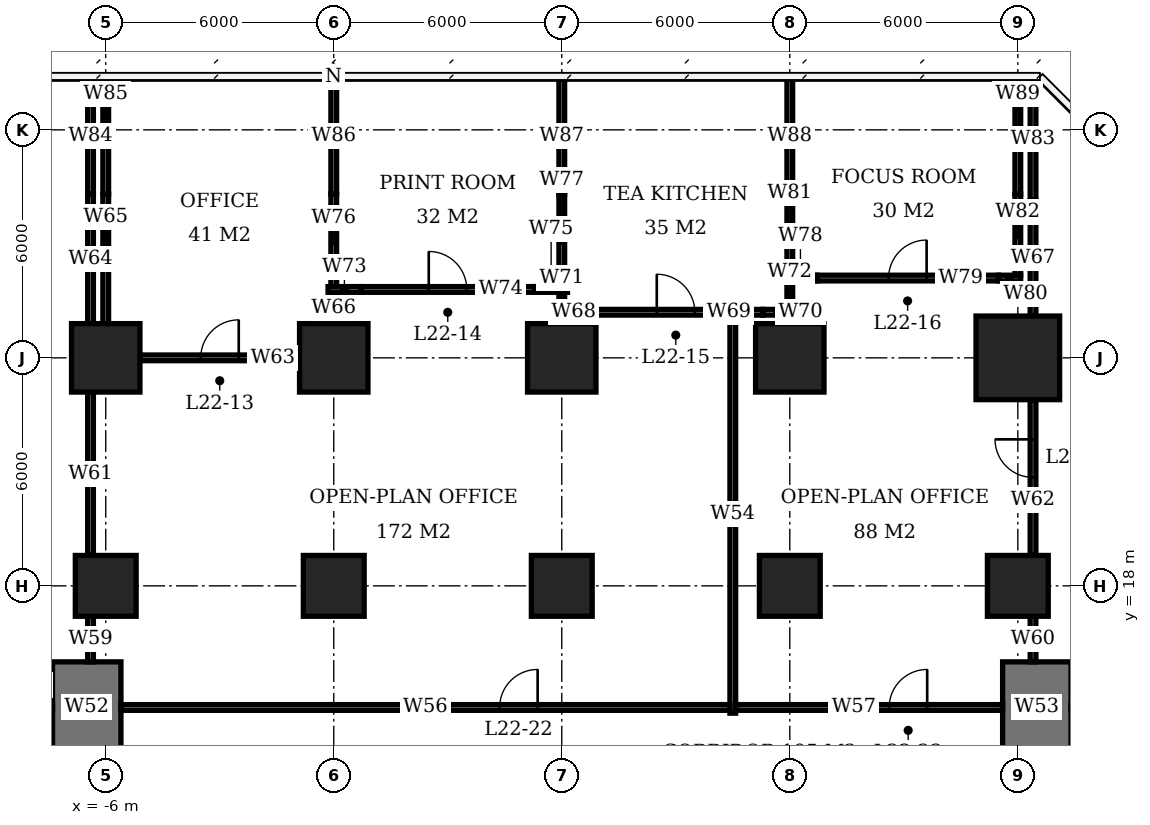
"""IFC4 building model, lengths in metres.
Left out: names, types, materials, properties, quantities, classifications, styles, units other than length and angle.
Written with IfcOpenShell. Run it as: python <this file> out.ifc"""

import sys

from ifc_helpers import new_model, si_unit, direction, frame, frame_2d, origin, origin_2d, place, context, subcontext, project, spatial, rectangle, extrude, element, fill, save


model = new_model("IFC4")
c1 = context("Model", 3, precision=1e-05, world=origin(), true_north=direction((0.0, 1.0)))
c2 = subcontext(c1, "Body", "Model", "MODEL_VIEW")
j1 = project(units=[si_unit("LENGTHUNIT", "METRE"), si_unit("PLANEANGLEUNIT", "RADIAN")], contexts=[c1])
p1 = place(None, origin())
s1 = spatial("IfcSite", under=j1, at=p1, CompositionType="ELEMENT")
p2 = place(p1, origin())
s2 = spatial("IfcBuilding", under=s1, at=p2, CompositionType="ELEMENT")
p3 = place(p2, frame((0.0, 0.0, 93.8)))
s3 = spatial("IfcBuildingStorey", under=s2, at=p3, CompositionType="ELEMENT", Elevation=93.8)
p4 = place(p3, frame((-6.0, 18.0, 0.0), z_axis=(0.0, 0.0, 1.0), x_axis=(1.0, 0.0, 0.0)))
e1 = element("IfcColumn", 1, at=p4, inside=s3, PredefinedType="COLUMN", context=c2, shape_type="SweptSolid", body=[
    extrude(rectangle(XDim=1.6, YDim=1.6, at=origin_2d()), origin(), (0.0, 0.0, 1.0), 3.9),
])
p5 = place(p3, frame((-6.0, 24.0, 0.0), z_axis=(0.0, 0.0, 1.0), x_axis=(1.0, 0.0, 0.0)))
e2 = element("IfcColumn", 2, at=p5, inside=s3, PredefinedType="COLUMN", context=c2, shape_type="SweptSolid", body=[
    extrude(rectangle(XDim=1.8, YDim=1.8, at=origin_2d()), origin(), (0.0, 0.0, 1.0), 3.9),
])
p6 = place(p3, frame((0.0, 18.0, 0.0), z_axis=(0.0, 0.0, 1.0), x_axis=(1.0, 0.0, 0.0)))
e3 = element("IfcColumn", 3, at=p6, inside=s3, PredefinedType="COLUMN", context=c2, shape_type="SweptSolid", body=[
    extrude(rectangle(XDim=1.6, YDim=1.6, at=origin_2d()), origin(), (0.0, 0.0, 1.0), 3.9),
])
p7 = place(p3, frame((0.0, 24.0, 0.0), z_axis=(0.0, 0.0, 1.0), x_axis=(1.0, 0.0, 0.0)))
e4 = element("IfcColumn", 4, at=p7, inside=s3, PredefinedType="COLUMN", context=c2, shape_type="SweptSolid", body=[
    extrude(rectangle(XDim=1.8, YDim=1.8, at=origin_2d()), origin(), (0.0, 0.0, 1.0), 3.9),
])
p8 = place(p3, frame((6.0, 18.0, 0.0), z_axis=(0.0, 0.0, 1.0), x_axis=(1.0, 0.0, 0.0)))
e5 = element("IfcColumn", 5, at=p8, inside=s3, PredefinedType="COLUMN", context=c2, shape_type="SweptSolid", body=[
    extrude(rectangle(XDim=1.6, YDim=1.6, at=origin_2d()), origin(), (0.0, 0.0, 1.0), 3.9),
])
p9 = place(p3, frame((6.0, 24.0, 0.0), z_axis=(0.0, 0.0, 1.0), x_axis=(1.0, 0.0, 0.0)))
e6 = element("IfcColumn", 6, at=p9, inside=s3, PredefinedType="COLUMN", context=c2, shape_type="SweptSolid", body=[
    extrude(rectangle(XDim=1.8, YDim=1.8, at=origin_2d()), origin(), (0.0, 0.0, 1.0), 3.9),
])
p10 = place(p3, frame((12.0, 18.0, 0.0), z_axis=(0.0, 0.0, 1.0), x_axis=(1.0, 0.0, 0.0)))
e7 = element("IfcColumn", 7, at=p10, inside=s3, PredefinedType="COLUMN", context=c2, shape_type="SweptSolid", body=[
    extrude(rectangle(XDim=1.6, YDim=1.6, at=origin_2d()), origin(), (0.0, 0.0, 1.0), 3.9),
])
p11 = place(p3, frame((12.0, 24.0, 0.0), z_axis=(0.0, 0.0, 1.0), x_axis=(1.0, 0.0, 0.0)))
e8 = element("IfcColumn", 8, at=p11, inside=s3, PredefinedType="COLUMN", context=c2, shape_type="SweptSolid", body=[
    extrude(rectangle(XDim=1.8, YDim=1.8, at=origin_2d()), origin(), (0.0, 0.0, 1.0), 3.9),
])
p12 = place(p3, frame((18.0, 18.0, 0.0), z_axis=(0.0, 0.0, 1.0), x_axis=(1.0, 0.0, 0.0)))
e9 = element("IfcColumn", 9, at=p12, inside=s3, PredefinedType="COLUMN", context=c2, shape_type="SweptSolid", body=[
    extrude(rectangle(XDim=1.6, YDim=1.6, at=origin_2d()), origin(), (0.0, 0.0, 1.0), 3.9),
])
p13 = place(p3, frame((18.0, 24.0, 0.0), z_axis=(0.0, 0.0, 1.0), x_axis=(1.0, 0.0, 0.0)))
e10 = element("IfcColumn", 10, at=p13, inside=s3, PredefinedType="COLUMN", context=c2, shape_type="SweptSolid", body=[
    extrude(rectangle(XDim=2.2, YDim=2.2, at=origin_2d()), origin(), (0.0, 0.0, 1.0), 3.9),
])
for number, where, z_axis, x_axis in (
    (11, (-6.5, 13.6, 0.0), (0.0, 0.0, 1.0), (0.0, 1.0, 0.0)),
    (12, (18.5, 13.6, 0.0), (0.0, 0.0, 1.0), (0.0, 1.0, 0.0)),
):
    element("IfcWall", number, at=place(p3, frame(where, z_axis=z_axis, x_axis=x_axis)), inside=s3, PredefinedType="SHEAR", context=c2, shape_type="SweptSolid", body=[
        extrude(rectangle(XDim=2.4, YDim=1.8, at=frame_2d((1.2, 0.0))), origin(), (0.0, 0.0, 1.0), 3.9),
    ])
p14 = place(p3, frame((-5.1, 24.0, 0.0), z_axis=(0.0, 0.0, 1.0), x_axis=(1.0, 0.0, 0.0)))
e13 = element("IfcWall", 13, at=p14, inside=s3, PredefinedType="PARTITIONING", context=c2, shape_type="SweptSolid", body=[
    extrude(rectangle(XDim=4.2, YDim=0.15, at=frame_2d((2.1, 0.0))), origin(), (0.0, 0.0, 1.0), 3.65),
])
p15 = place(p14, frame((1.6, 0.0, 0.0)))
e14 = element("IfcOpeningElement", 14, at=p15, cuts=e13, PredefinedType="OPENING", context=c2, shape_type="SweptSolid", body=[
    extrude(rectangle(XDim=1.0, YDim=2.1, at=frame_2d((0.5, 1.05))), frame((0.0, 0.085, 0.0), z_axis=(0.0, -1.0, 0.0), x_axis=(1.0, 0.0, 0.0)), (0.0, 0.0, 1.0), 0.17),
])
p16 = place(p3, frame((5.925, 25.2, 0.0), z_axis=(0.0, 0.0, 1.0), x_axis=(1.0, 0.0, 0.0)))
e15 = element("IfcWall", 15, at=p16, inside=s3, PredefinedType="PARTITIONING", context=c2, shape_type="SweptSolid", body=[
    extrude(rectangle(XDim=0.785, YDim=0.15, at=frame_2d((0.393, 0.0))), origin(), (0.0, 0.0, 1.0), 2.65),
])
p17 = place(p3, frame((6.71, 25.2, 0.0), z_axis=(0.0, 0.0, 1.0), x_axis=(1.0, 0.0, 0.0)))
e16 = element("IfcWall", 16, at=p17, inside=s3, PredefinedType="PARTITIONING", context=c2, shape_type="SweptSolid", body=[
    extrude(rectangle(XDim=4.58, YDim=0.15, at=frame_2d((2.29, 0.0))), origin(), (0.0, 0.0, 1.0), 3.65),
])
p18 = place(p17, frame((1.79, 0.0, 0.0)))
e17 = element("IfcOpeningElement", 17, at=p18, cuts=e16, PredefinedType="OPENING", context=c2, shape_type="SweptSolid", body=[
    extrude(rectangle(XDim=1.0, YDim=2.1, at=frame_2d((0.5, 1.05))), frame((0.0, 0.085, 0.0), z_axis=(0.0, -1.0, 0.0), x_axis=(1.0, 0.0, 0.0)), (0.0, 0.0, 1.0), 0.17),
])
p19 = place(p3, frame((11.29, 25.2, 0.0), z_axis=(0.0, 0.0, 1.0), x_axis=(1.0, 0.0, 0.0)))
e18 = element("IfcWall", 18, at=p19, inside=s3, PredefinedType="PARTITIONING", context=c2, shape_type="SweptSolid", body=[
    extrude(rectangle(XDim=0.785, YDim=0.15, at=frame_2d((0.393, 0.0))), origin(), (0.0, 0.0, 1.0), 2.65),
])
p20 = place(p3, frame((-0.15, 25.8, 0.0), z_axis=(0.0, 0.0, 1.0), x_axis=(1.0, 0.0, 0.0)))
e19 = element("IfcWall", 19, at=p20, inside=s3, PredefinedType="PARTITIONING", context=c2, shape_type="SweptSolid", body=[
    extrude(rectangle(XDim=0.86, YDim=0.15, at=frame_2d((0.43, 0.0))), origin(), (0.0, 0.0, 1.0), 2.65),
])
p21 = place(p3, frame((0.71, 25.8, 0.0), z_axis=(0.0, 0.0, 1.0), x_axis=(1.0, 0.0, 0.0)))
e20 = element("IfcWall", 20, at=p21, inside=s3, PredefinedType="PARTITIONING", context=c2, shape_type="SweptSolid", body=[
    extrude(rectangle(XDim=4.58, YDim=0.15, at=frame_2d((2.29, 0.0))), origin(), (0.0, 0.0, 1.0), 3.65),
])
p22 = place(p21, frame((1.79, 0.0, 0.0)))
e21 = element("IfcOpeningElement", 21, at=p22, cuts=e20, PredefinedType="OPENING", context=c2, shape_type="SweptSolid", body=[
    extrude(rectangle(XDim=1.0, YDim=2.1, at=frame_2d((0.5, 1.05))), frame((0.0, 0.085, 0.0), z_axis=(0.0, -1.0, 0.0), x_axis=(1.0, 0.0, 0.0)), (0.0, 0.0, 1.0), 0.17),
])
for number, where, z_axis, x_axis in (
    (22, (5.29, 25.8, 0.0), (0.0, 0.0, 1.0), (1.0, 0.0, 0.0)),
    (23, (11.85, 26.1, 0.0), (0.0, 0.0, 1.0), (1.0, 0.0, 0.0)),
):
    element("IfcWall", number, at=place(p3, frame(where, z_axis=z_axis, x_axis=x_axis)), inside=s3, PredefinedType="PARTITIONING", context=c2, shape_type="SweptSolid", body=[
        extrude(rectangle(XDim=0.86, YDim=0.15, at=frame_2d((0.43, 0.0))), origin(), (0.0, 0.0, 1.0), 2.65),
    ])
p23 = place(p3, frame((12.71, 26.1, 0.0), z_axis=(0.0, 0.0, 1.0), x_axis=(1.0, 0.0, 0.0)))
e24 = element("IfcWall", 24, at=p23, inside=s3, PredefinedType="PARTITIONING", context=c2, shape_type="SweptSolid", body=[
    extrude(rectangle(XDim=4.78, YDim=0.15, at=frame_2d((2.39, 0.0))), origin(), (0.0, 0.0, 1.0), 3.65),
])
p24 = place(p23, frame((1.89, 0.0, 0.0)))
e25 = element("IfcOpeningElement", 25, at=p24, cuts=e24, PredefinedType="OPENING", context=c2, shape_type="SweptSolid", body=[
    extrude(rectangle(XDim=1.0, YDim=2.1, at=frame_2d((0.5, 1.05))), frame((0.0, 0.085, 0.0), z_axis=(0.0, -1.0, 0.0), x_axis=(1.0, 0.0, 0.0)), (0.0, 0.0, 1.0), 0.17),
])
p25 = place(p3, frame((17.49, 26.1, 0.0), z_axis=(0.0, 0.0, 1.0), x_axis=(1.0, 0.0, 0.0)))
e26 = element("IfcWall", 26, at=p25, inside=s3, PredefinedType="PARTITIONING", context=c2, shape_type="SweptSolid", body=[
    extrude(rectangle(XDim=0.585, YDim=0.15, at=frame_2d((0.292, 0.0))), origin(), (0.0, 0.0, 1.0), 2.65),
])
p26 = place(p3, frame((-6.0, 24.9, 0.0), z_axis=(0.0, 0.0, 1.0), x_axis=(0.0, 1.0, 0.0)))
e27 = element("IfcWall", 27, at=p26, inside=s3, PredefinedType="PARTITIONING", context=c2, shape_type="SweptSolid", body=[
    extrude(rectangle(XDim=3.41, YDim=0.15, at=frame_2d((1.705, 0.0))), origin(), (0.0, 0.0, 1.0), 2.65),
])
p27 = place(p3, frame((-6.0, 28.31, 0.0), z_axis=(0.0, 0.0, 1.0), x_axis=(0.0, 1.0, 0.0)))
e28 = element("IfcWall", 28, at=p27, inside=s3, PredefinedType="PARTITIONING", context=c2, shape_type="SweptSolid", body=[
    extrude(rectangle(XDim=3.065, YDim=0.15, at=frame_2d((1.532, 0.0))), origin(), (0.0, 0.0, 1.0), 3.65),
])
p28 = place(p3, frame((0.0, 24.9, 0.0), z_axis=(0.0, 0.0, 1.0), x_axis=(0.0, 1.0, 0.0)))
e29 = element("IfcWall", 29, at=p28, inside=s3, PredefinedType="PARTITIONING", context=c2, shape_type="SweptSolid", body=[
    extrude(rectangle(XDim=0.825, YDim=0.15, at=frame_2d((0.413, 0.0))), origin(), (0.0, 0.0, 1.0), 2.65),
])
p29 = place(p3, frame((0.0, 25.875, 0.0), z_axis=(0.0, 0.0, 1.0), x_axis=(0.0, 1.0, 0.0)))
e30 = element("IfcWall", 30, at=p29, inside=s3, PredefinedType="PARTITIONING", context=c2, shape_type="SweptSolid", body=[
    extrude(rectangle(XDim=2.435, YDim=0.15, at=frame_2d((1.218, 0.0))), origin(), (0.0, 0.0, 1.0), 2.65),
])
p30 = place(p3, frame((0.0, 28.31, 0.0), z_axis=(0.0, 0.0, 1.0), x_axis=(0.0, 1.0, 0.0)))
e31 = element("IfcWall", 31, at=p30, inside=s3, PredefinedType="PARTITIONING", context=c2, shape_type="SweptSolid", body=[
    extrude(rectangle(XDim=3.04, YDim=0.15, at=frame_2d((1.52, 0.0))), origin(), (0.0, 0.0, 1.0), 3.65),
])
p31 = place(p3, frame((6.0, 25.275, 0.0), z_axis=(0.0, 0.0, 1.0), x_axis=(0.0, 1.0, 0.0)))
e32 = element("IfcWall", 32, at=p31, inside=s3, PredefinedType="PARTITIONING", context=c2, shape_type="SweptSolid", body=[
    extrude(rectangle(XDim=0.45, YDim=0.15, at=frame_2d((0.225, 0.0))), origin(), (0.0, 0.0, 1.0), 2.65),
])
p32 = place(p3, frame((6.0, 25.875, 0.0), z_axis=(0.0, 0.0, 1.0), x_axis=(0.0, 1.0, 0.0)))
e33 = element("IfcWall", 33, at=p32, inside=s3, PredefinedType="PARTITIONING", context=c2, shape_type="SweptSolid", body=[
    extrude(rectangle(XDim=2.435, YDim=0.15, at=frame_2d((1.218, 0.0))), origin(), (0.0, 0.0, 1.0), 2.65),
])
p33 = place(p3, frame((6.0, 28.31, 0.0), z_axis=(0.0, 0.0, 1.0), x_axis=(0.0, 1.0, 0.0)))
e34 = element("IfcWall", 34, at=p33, inside=s3, PredefinedType="PARTITIONING", context=c2, shape_type="SweptSolid", body=[
    extrude(rectangle(XDim=3.065, YDim=0.15, at=frame_2d((1.532, 0.0))), origin(), (0.0, 0.0, 1.0), 3.65),
])
p34 = place(p3, frame((12.0, 25.275, 0.0), z_axis=(0.0, 0.0, 1.0), x_axis=(0.0, 1.0, 0.0)))
e35 = element("IfcWall", 35, at=p34, inside=s3, PredefinedType="PARTITIONING", context=c2, shape_type="SweptSolid", body=[
    extrude(rectangle(XDim=0.75, YDim=0.15, at=frame_2d((0.375, 0.0))), origin(), (0.0, 0.0, 1.0), 2.65),
])
p35 = place(p3, frame((12.0, 26.175, 0.0), z_axis=(0.0, 0.0, 1.0), x_axis=(0.0, 1.0, 0.0)))
e36 = element("IfcWall", 36, at=p35, inside=s3, PredefinedType="PARTITIONING", context=c2, shape_type="SweptSolid", body=[
    extrude(rectangle(XDim=2.135, YDim=0.15, at=frame_2d((1.067, 0.0))), origin(), (0.0, 0.0, 1.0), 2.65),
])
p36 = place(p3, frame((12.0, 28.31, 0.0), z_axis=(0.0, 0.0, 1.0), x_axis=(0.0, 1.0, 0.0)))
e37 = element("IfcWall", 37, at=p36, inside=s3, PredefinedType="PARTITIONING", context=c2, shape_type="SweptSolid", body=[
    extrude(rectangle(XDim=3.065, YDim=0.15, at=frame_2d((1.532, 0.0))), origin(), (0.0, 0.0, 1.0), 3.65),
])
p37 = place(p3, frame((18.0, 26.175, 0.0), z_axis=(0.0, 0.0, 1.0), x_axis=(0.0, 1.0, 0.0)))
e38 = element("IfcWall", 38, at=p37, inside=s3, PredefinedType="PARTITIONING", context=c2, shape_type="SweptSolid", body=[
    extrude(rectangle(XDim=2.135, YDim=0.15, at=frame_2d((1.067, 0.0))), origin(), (0.0, 0.0, 1.0), 2.65),
])
p38 = place(p3, frame((18.0, 28.31, 0.0), z_axis=(0.0, 0.0, 1.0), x_axis=(0.0, 1.0, 0.0)))
e39 = element("IfcWall", 39, at=p38, inside=s3, PredefinedType="PARTITIONING", context=c2, shape_type="SweptSolid", body=[
    extrude(rectangle(XDim=3.065, YDim=0.15, at=frame_2d((1.532, 0.0))), origin(), (0.0, 0.0, 1.0), 3.65),
])
p39 = place(p3, frame((-6.4, 16.0, 0.0), z_axis=(0.0, 0.0, 1.0), x_axis=(0.0, 1.0, 0.0)))
e40 = element("IfcWall", 40, at=p39, inside=s3, PredefinedType="PARTITIONING", context=c2, shape_type="SweptSolid", body=[
    extrude(rectangle(XDim=1.2, YDim=0.15, at=frame_2d((0.6, 0.0))), origin(), (0.0, 0.0, 1.0), 3.65),
])
p40 = place(p3, frame((-6.4, 18.8, 0.0), z_axis=(0.0, 0.0, 1.0), x_axis=(0.0, 1.0, 0.0)))
e41 = element("IfcWall", 41, at=p40, inside=s3, PredefinedType="PARTITIONING", context=c2, shape_type="SweptSolid", body=[
    extrude(rectangle(XDim=4.3, YDim=0.15, at=frame_2d((2.15, 0.0))), origin(), (0.0, 0.0, 1.0), 3.65),
])
p41 = place(p3, frame((-6.4, 24.9, 0.0), z_axis=(0.0, 0.0, 1.0), x_axis=(0.0, 1.0, 0.0)))
e42 = element("IfcWall", 42, at=p41, inside=s3, PredefinedType="PARTITIONING", context=c2, shape_type="SweptSolid", body=[
    extrude(rectangle(XDim=3.41, YDim=0.15, at=frame_2d((1.705, 0.0))), origin(), (0.0, 0.0, 1.0), 2.65),
])
p42 = place(p3, frame((-6.4, 28.31, 0.0), z_axis=(0.0, 0.0, 1.0), x_axis=(0.0, 1.0, 0.0)))
e43 = element("IfcWall", 43, at=p42, inside=s3, PredefinedType="PARTITIONING", context=c2, shape_type="SweptSolid", body=[
    extrude(rectangle(XDim=3.065, YDim=0.15, at=frame_2d((1.532, 0.0))), origin(), (0.0, 0.0, 1.0), 3.65),
])
p43 = place(p3, frame((-5.6, 14.8, 0.0), z_axis=(0.0, 0.0, 1.0), x_axis=(1.0, 0.0, 0.0)))
e44 = element("IfcWall", 44, at=p43, inside=s3, PredefinedType="PARTITIONING", context=c2, shape_type="SweptSolid", body=[
    extrude(rectangle(XDim=16.025, YDim=0.15, at=frame_2d((8.013, 0.0))), origin(), (0.0, 0.0, 1.0), 3.65),
])
p44 = place(p43, frame((9.965, 0.0, 0.0)))
e45 = element("IfcOpeningElement", 45, at=p44, cuts=e44, PredefinedType="OPENING", context=c2, shape_type="SweptSolid", body=[
    extrude(rectangle(XDim=1.0, YDim=2.1, at=frame_2d((0.5, 1.05))), frame((0.0, 0.085, 0.0), z_axis=(0.0, -1.0, 0.0), x_axis=(1.0, 0.0, 0.0)), (0.0, 0.0, 1.0), 0.17),
])
p45 = place(p3, frame((10.5, 14.65, 0.0), z_axis=(0.0, 0.0, 1.0), x_axis=(0.0, 1.0, 0.0)))
e46 = element("IfcWall", 46, at=p45, inside=s3, PredefinedType="PARTITIONING", context=c2, shape_type="SweptSolid", body=[
    extrude(rectangle(XDim=10.475, YDim=0.15, at=frame_2d((5.238, 0.0))), origin(), (0.0, 0.0, 1.0), 3.65),
])
p46 = place(p3, frame((10.575, 14.8, 0.0), z_axis=(0.0, 0.0, 1.0), x_axis=(1.0, 0.0, 0.0)))
e47 = element("IfcWall", 47, at=p46, inside=s3, PredefinedType="PARTITIONING", context=c2, shape_type="SweptSolid", body=[
    extrude(rectangle(XDim=7.025, YDim=0.15, at=frame_2d((3.513, 0.0))), origin(), (0.0, 0.0, 1.0), 3.65),
])
p47 = place(p46, frame((4.04, 0.0, 0.0)))
e48 = element("IfcOpeningElement", 48, at=p47, cuts=e47, PredefinedType="OPENING", context=c2, shape_type="SweptSolid", body=[
    extrude(rectangle(XDim=1.0, YDim=2.1, at=frame_2d((0.5, 1.05))), frame((0.0, 0.085, 0.0), z_axis=(0.0, -1.0, 0.0), x_axis=(1.0, 0.0, 0.0)), (0.0, 0.0, 1.0), 0.17),
])
p48 = place(p3, frame((18.4, 16.0, 0.0), z_axis=(0.0, 0.0, 1.0), x_axis=(0.0, 1.0, 0.0)))
e49 = element("IfcWall", 49, at=p48, inside=s3, PredefinedType="PARTITIONING", context=c2, shape_type="SweptSolid", body=[
    extrude(rectangle(XDim=1.2, YDim=0.15, at=frame_2d((0.6, 0.0))), origin(), (0.0, 0.0, 1.0), 3.65),
])
p49 = place(p3, frame((18.4, 18.8, 0.0), z_axis=(0.0, 0.0, 1.0), x_axis=(0.0, 1.0, 0.0)))
e50 = element("IfcWall", 50, at=p49, inside=s3, PredefinedType="PARTITIONING", context=c2, shape_type="SweptSolid", body=[
    extrude(rectangle(XDim=4.1, YDim=0.15, at=frame_2d((2.05, 0.0))), origin(), (0.0, 0.0, 1.0), 3.65),
])
p50 = place(p49, frame((2.055, 0.0, 0.0)))
e51 = element("IfcOpeningElement", 51, at=p50, cuts=e50, PredefinedType="OPENING", context=c2, shape_type="SweptSolid", body=[
    extrude(rectangle(XDim=1.0, YDim=2.1, at=frame_2d((0.5, 1.05))), frame((0.0, 0.085, 0.0), z_axis=(0.0, -1.0, 0.0), x_axis=(1.0, 0.0, 0.0)), (0.0, 0.0, 1.0), 0.17),
])
p51 = place(p3, frame((18.4, 25.1, 0.0), z_axis=(0.0, 0.0, 1.0), x_axis=(0.0, 1.0, 0.0)))
e52 = element("IfcWall", 52, at=p51, inside=s3, PredefinedType="PARTITIONING", context=c2, shape_type="SweptSolid", body=[
    extrude(rectangle(XDim=3.04, YDim=0.15, at=frame_2d((1.52, 0.0))), origin(), (0.0, 0.0, 1.0), 2.65),
])
p52 = place(p3, frame((18.4, 28.14, 0.0), z_axis=(0.0, 0.0, 1.0), x_axis=(0.0, 1.0, 0.0)))
e53 = element("IfcWall", 53, at=p52, inside=s3, PredefinedType="PARTITIONING", context=c2, shape_type="SweptSolid", body=[
    extrude(rectangle(XDim=3.235, YDim=0.15, at=frame_2d((1.618, 0.0))), origin(), (0.0, 0.0, 1.0), 3.65),
])
p53 = place(p15, origin())
e54 = element("IfcDoor", 54, at=p53, inside=s3, OperationType="SINGLE_SWING_RIGHT", PredefinedType="DOOR", context=c2, shape_type="SweptSolid", body=[
    extrude(rectangle(XDim=1.0, YDim=2.1, at=frame_2d((0.5, 1.05))), frame((0.0, 0.025, 0.0), z_axis=(0.0, -1.0, 0.0), x_axis=(1.0, 0.0, 0.0)), (0.0, 0.0, 1.0), 0.05),
])
fill(e14, e54)
p54 = place(p22, origin())
e55 = element("IfcDoor", 55, at=p54, inside=s3, OperationType="SINGLE_SWING_LEFT", PredefinedType="DOOR", context=c2, shape_type="SweptSolid", body=[
    extrude(rectangle(XDim=1.0, YDim=2.1, at=frame_2d((0.5, 1.05))), frame((0.0, 0.025, 0.0), z_axis=(0.0, -1.0, 0.0), x_axis=(1.0, 0.0, 0.0)), (0.0, 0.0, 1.0), 0.05),
])
fill(e21, e55)
p55 = place(p18, origin())
e56 = element("IfcDoor", 56, at=p55, inside=s3, OperationType="SINGLE_SWING_LEFT", PredefinedType="DOOR", context=c2, shape_type="SweptSolid", body=[
    extrude(rectangle(XDim=1.0, YDim=2.1, at=frame_2d((0.5, 1.05))), frame((0.0, 0.025, 0.0), z_axis=(0.0, -1.0, 0.0), x_axis=(1.0, 0.0, 0.0)), (0.0, 0.0, 1.0), 0.05),
])
fill(e17, e56)
p56 = place(p24, origin())
e57 = element("IfcDoor", 57, at=p56, inside=s3, OperationType="SINGLE_SWING_RIGHT", PredefinedType="DOOR", context=c2, shape_type="SweptSolid", body=[
    extrude(rectangle(XDim=1.0, YDim=2.1, at=frame_2d((0.5, 1.05))), frame((0.0, 0.025, 0.0), z_axis=(0.0, -1.0, 0.0), x_axis=(1.0, 0.0, 0.0)), (0.0, 0.0, 1.0), 0.05),
])
fill(e25, e57)
p57 = place(p44, origin())
e58 = element("IfcDoor", 58, at=p57, inside=s3, OperationType="SINGLE_SWING_RIGHT", PredefinedType="DOOR", context=c2, shape_type="SweptSolid", body=[
    extrude(rectangle(XDim=1.0, YDim=2.1, at=frame_2d((0.5, 1.05))), frame((0.0, 0.025, 0.0), z_axis=(0.0, -1.0, 0.0), x_axis=(1.0, 0.0, 0.0)), (0.0, 0.0, 1.0), 0.05),
])
fill(e45, e58)
p58 = place(p47, origin())
e59 = element("IfcDoor", 59, at=p58, inside=s3, OperationType="SINGLE_SWING_RIGHT", PredefinedType="DOOR", context=c2, shape_type="SweptSolid", body=[
    extrude(rectangle(XDim=1.0, YDim=2.1, at=frame_2d((0.5, 1.05))), frame((0.0, 0.025, 0.0), z_axis=(0.0, -1.0, 0.0), x_axis=(1.0, 0.0, 0.0)), (0.0, 0.0, 1.0), 0.05),
])
fill(e48, e59)
p59 = place(p50, origin())
e60 = element("IfcDoor", 60, at=p59, inside=s3, OperationType="SINGLE_SWING_RIGHT", PredefinedType="DOOR", context=c2, shape_type="SweptSolid", body=[
    extrude(rectangle(XDim=1.0, YDim=2.1, at=frame_2d((0.5, 1.05))), frame((0.0, 0.025, 0.0), z_axis=(0.0, -1.0, 0.0), x_axis=(1.0, 0.0, 0.0)), (0.0, 0.0, 1.0), 0.05),
])
fill(e51, e60)
save(model, sys.argv[1])
